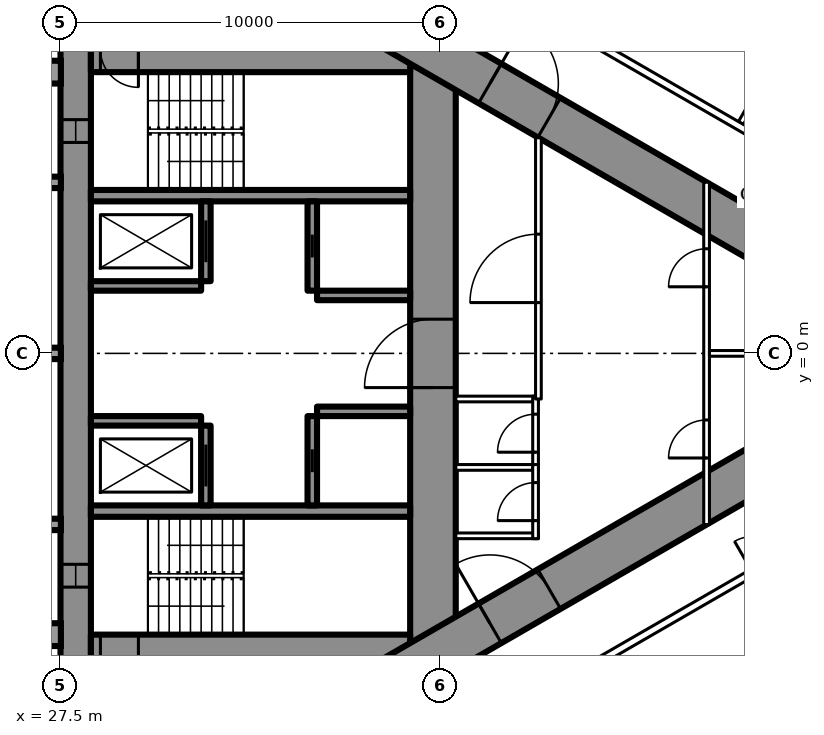
"""IFC4 building model, lengths in metres.
Left out: names, types, materials, properties, quantities, classifications, styles, units other than length and angle.
Written with IfcOpenShell. Run it as: python <this file> out.ifc"""

import sys

from ifc_helpers import new_model, si_unit, direction, frame, frame_2d, origin, place, context, subcontext, project, spatial, rectangle, extrude, element, fill, save


model = new_model("IFC4")
c1 = context("Model", 3, precision=1e-05, world=origin(), true_north=direction((0.0, 1.0)))
c2 = subcontext(c1, "Body", "Model", "MODEL_VIEW")
j1 = project(units=[si_unit("LENGTHUNIT", "METRE"), si_unit("PLANEANGLEUNIT", "RADIAN")], contexts=[c1])
p1 = place(None, origin())
s1 = spatial("IfcSite", under=j1, at=p1, CompositionType="ELEMENT")
p2 = place(p1, origin())
s2 = spatial("IfcBuilding", under=s1, at=p2, CompositionType="ELEMENT")
p3 = place(p2, frame((0.0, 0.0, 70.5)))
s3 = spatial("IfcBuildingStorey", under=s2, at=p3, CompositionType="ELEMENT", Elevation=70.5)
p4 = place(p3, frame((27.9, -8.6, 0.0), z_axis=(0.0, 0.0, 1.0), x_axis=(0.0, 1.0, 0.0)))
e1 = element("IfcWall", 1, at=p4, inside=s3, PredefinedType="SHEAR", context=c2, shape_type="SweptSolid", body=[
    extrude(rectangle(XDim=17.2, YDim=0.8, at=frame_2d((8.6, 0.0))), origin(), (0.0, 0.0, 1.0), 3.5),
])
p5 = place(p4, frame((2.45, 0.0, 0.6)))
e2 = element("IfcOpeningElement", 2, at=p5, cuts=e1, PredefinedType="OPENING", context=c2, shape_type="SweptSolid", body=[
    extrude(rectangle(XDim=0.6, YDim=2.1, at=frame_2d((0.3, 1.05))), frame((0.0, 0.41, 0.0), z_axis=(0.0, -1.0, 0.0), x_axis=(1.0, 0.0, 0.0)), (0.0, 0.0, 1.0), 0.82),
])
p6 = place(p4, frame((14.15, 0.0, 0.6)))
e3 = element("IfcOpeningElement", 3, at=p6, cuts=e1, PredefinedType="OPENING", context=c2, shape_type="SweptSolid", body=[
    extrude(rectangle(XDim=0.6, YDim=2.1, at=frame_2d((0.3, 1.05))), frame((0.0, 0.41, 0.0), z_axis=(0.0, -1.0, 0.0), x_axis=(1.0, 0.0, 0.0)), (0.0, 0.0, 1.0), 0.82),
])
p7 = place(p3, frame((37.3, -8.6, 0.0), z_axis=(0.0, 0.0, 1.0), x_axis=(0.0, 1.0, 0.0)))
e4 = element("IfcWall", 4, at=p7, inside=s3, PredefinedType="SHEAR", context=c2, shape_type="SweptSolid", body=[
    extrude(rectangle(XDim=17.2, YDim=1.2, at=frame_2d((8.6, 0.0))), origin(), (0.0, 0.0, 1.0), 3.5),
])
p8 = place(p7, frame((7.7, 0.0, 0.0)))
e5 = element("IfcOpeningElement", 5, at=p8, cuts=e4, PredefinedType="OPENING", context=c2, shape_type="SweptSolid", body=[
    extrude(rectangle(XDim=1.8, YDim=2.2, at=frame_2d((0.9, 1.1))), frame((0.0, 0.61, 0.0), z_axis=(0.0, -1.0, 0.0), x_axis=(1.0, 0.0, 0.0)), (0.0, 0.0, 1.0), 1.22),
])
p9 = place(p3, frame((28.3, -8.0, 0.0), z_axis=(0.0, 0.0, 1.0), x_axis=(1.0, 0.0, 0.0)))
e6 = element("IfcWall", 6, at=p9, inside=s3, PredefinedType="SHEAR", context=c2, shape_type="SweptSolid", body=[
    extrude(rectangle(XDim=8.4, YDim=1.2, at=frame_2d((4.2, 0.0))), origin(), (0.0, 0.0, 1.0), 3.5),
])
p10 = place(p9, frame((0.25, 0.0, 0.0)))
e7 = element("IfcOpeningElement", 7, at=p10, cuts=e6, PredefinedType="OPENING", context=c2, shape_type="SweptSolid", body=[
    extrude(rectangle(XDim=1.0, YDim=2.2, at=frame_2d((0.5, 1.1))), frame((0.0, 0.61, 0.0), z_axis=(0.0, -1.0, 0.0), x_axis=(1.0, 0.0, 0.0)), (0.0, 0.0, 1.0), 1.22),
])
p11 = place(p3, frame((28.3, 8.0, 0.0), z_axis=(0.0, 0.0, 1.0), x_axis=(1.0, 0.0, 0.0)))
e8 = element("IfcWall", 8, at=p11, inside=s3, PredefinedType="SHEAR", context=c2, shape_type="SweptSolid", body=[
    extrude(rectangle(XDim=8.4, YDim=1.2, at=frame_2d((4.2, 0.0))), origin(), (0.0, 0.0, 1.0), 3.5),
])
p12 = place(p11, frame((0.25, 0.0, 0.0)))
e9 = element("IfcOpeningElement", 9, at=p12, cuts=e8, PredefinedType="OPENING", context=c2, shape_type="SweptSolid", body=[
    extrude(rectangle(XDim=1.0, YDim=2.2, at=frame_2d((0.5, 1.1))), frame((0.0, 0.61, 0.0), z_axis=(0.0, -1.0, 0.0), x_axis=(1.0, 0.0, 0.0)), (0.0, 0.0, 1.0), 1.22),
])
for number, where, z_axis, x_axis in (
    (10, (28.3, -4.15, 0.0), (0.0, 0.0, 1.0), (1.0, 0.0, 0.0)),
    (11, (28.3, 4.15, 0.0), (0.0, 0.0, 1.0), (1.0, 0.0, 0.0)),
):
    element("IfcWall", number, at=place(p3, frame(where, z_axis=z_axis, x_axis=x_axis)), inside=s3, PredefinedType="SHEAR", context=c2, shape_type="SweptSolid", body=[
        extrude(rectangle(XDim=8.4, YDim=0.3, at=frame_2d((4.2, 0.0))), origin(), (0.0, 0.0, 1.0), 3.5),
    ])
p13 = place(p3, frame((31.325, -4.0, 0.0), z_axis=(0.0, 0.0, 1.0), x_axis=(0.0, 1.0, 0.0)))
e12 = element("IfcWall", 12, at=p13, inside=s3, PredefinedType="SHEAR", context=c2, shape_type="SweptSolid", body=[
    extrude(rectangle(XDim=2.1, YDim=0.25, at=frame_2d((1.05, 0.0))), origin(), (0.0, 0.0, 1.0), 3.5),
])
p14 = place(p13, frame((0.5, 0.0, 0.0)))
e13 = element("IfcOpeningElement", 13, at=p14, cuts=e12, PredefinedType="OPENING", context=c2, shape_type="SweptSolid", body=[
    extrude(rectangle(XDim=1.1, YDim=2.2, at=frame_2d((0.55, 1.1))), frame((0.0, 0.135, 0.0), z_axis=(0.0, -1.0, 0.0), x_axis=(1.0, 0.0, 0.0)), (0.0, 0.0, 1.0), 0.27),
])
p15 = place(p3, frame((34.125, -4.0, 0.0), z_axis=(0.0, 0.0, 1.0), x_axis=(0.0, 1.0, 0.0)))
e14 = element("IfcWall", 14, at=p15, inside=s3, PredefinedType="SHEAR", context=c2, shape_type="SweptSolid", body=[
    extrude(rectangle(XDim=2.35, YDim=0.25, at=frame_2d((1.175, 0.0))), origin(), (0.0, 0.0, 1.0), 3.5),
])
p16 = place(p15, frame((0.875, 0.0, 0.0)))
e15 = element("IfcOpeningElement", 15, at=p16, cuts=e14, PredefinedType="OPENING", context=c2, shape_type="SweptSolid", body=[
    extrude(rectangle(XDim=0.6, YDim=2.0, at=frame_2d((0.3, 1.0))), frame((0.0, 0.135, 0.0), z_axis=(0.0, -1.0, 0.0), x_axis=(1.0, 0.0, 0.0)), (0.0, 0.0, 1.0), 0.27),
])
p17 = place(p3, frame((28.3, -1.775, 0.0), z_axis=(0.0, 0.0, 1.0), x_axis=(1.0, 0.0, 0.0)))
e16 = element("IfcWall", 16, at=p17, inside=s3, PredefinedType="SHEAR", context=c2, shape_type="SweptSolid", body=[
    extrude(rectangle(XDim=2.9, YDim=0.25, at=frame_2d((1.45, 0.0))), origin(), (0.0, 0.0, 1.0), 3.5),
])
p18 = place(p3, frame((34.25, -1.525, 0.0), z_axis=(0.0, 0.0, 1.0), x_axis=(1.0, 0.0, 0.0)))
e17 = element("IfcWall", 17, at=p18, inside=s3, PredefinedType="SHEAR", context=c2, shape_type="SweptSolid", body=[
    extrude(rectangle(XDim=2.45, YDim=0.25, at=frame_2d((1.225, 0.0))), origin(), (0.0, 0.0, 1.0), 3.5),
])
p19 = place(p3, frame((31.325, 1.9, 0.0), z_axis=(0.0, 0.0, 1.0), x_axis=(0.0, 1.0, 0.0)))
e18 = element("IfcWall", 18, at=p19, inside=s3, PredefinedType="SHEAR", context=c2, shape_type="SweptSolid", body=[
    extrude(rectangle(XDim=2.1, YDim=0.25, at=frame_2d((1.05, 0.0))), origin(), (0.0, 0.0, 1.0), 3.5),
])
p20 = place(p19, frame((0.5, 0.0, 0.0)))
e19 = element("IfcOpeningElement", 19, at=p20, cuts=e18, PredefinedType="OPENING", context=c2, shape_type="SweptSolid", body=[
    extrude(rectangle(XDim=1.1, YDim=2.2, at=frame_2d((0.55, 1.1))), frame((0.0, 0.135, 0.0), z_axis=(0.0, -1.0, 0.0), x_axis=(1.0, 0.0, 0.0)), (0.0, 0.0, 1.0), 0.27),
])
p21 = place(p3, frame((34.125, 1.65, 0.0), z_axis=(0.0, 0.0, 1.0), x_axis=(0.0, 1.0, 0.0)))
e20 = element("IfcWall", 20, at=p21, inside=s3, PredefinedType="SHEAR", context=c2, shape_type="SweptSolid", body=[
    extrude(rectangle(XDim=2.35, YDim=0.25, at=frame_2d((1.175, 0.0))), origin(), (0.0, 0.0, 1.0), 3.5),
])
p22 = place(p21, frame((0.875, 0.0, 0.0)))
e21 = element("IfcOpeningElement", 21, at=p22, cuts=e20, PredefinedType="OPENING", context=c2, shape_type="SweptSolid", body=[
    extrude(rectangle(XDim=0.6, YDim=2.0, at=frame_2d((0.3, 1.0))), frame((0.0, 0.135, 0.0), z_axis=(0.0, -1.0, 0.0), x_axis=(1.0, 0.0, 0.0)), (0.0, 0.0, 1.0), 0.27),
])
p23 = place(p3, frame((28.3, 1.775, 0.0), z_axis=(0.0, 0.0, 1.0), x_axis=(1.0, 0.0, 0.0)))
e22 = element("IfcWall", 22, at=p23, inside=s3, PredefinedType="SHEAR", context=c2, shape_type="SweptSolid", body=[
    extrude(rectangle(XDim=2.9, YDim=0.25, at=frame_2d((1.45, 0.0))), origin(), (0.0, 0.0, 1.0), 3.5),
])
p24 = place(p3, frame((34.25, 1.525, 0.0), z_axis=(0.0, 0.0, 1.0), x_axis=(1.0, 0.0, 0.0)))
e23 = element("IfcWall", 23, at=p24, inside=s3, PredefinedType="SHEAR", context=c2, shape_type="SweptSolid", body=[
    extrude(rectangle(XDim=2.45, YDim=0.25, at=frame_2d((1.225, 0.0))), origin(), (0.0, 0.0, 1.0), 3.5),
])
p25 = place(p3, frame((27.2, -13.8, 0.0), z_axis=(0.0, 0.0, 1.0), x_axis=(0.866027159892, 0.499996958321, 0.0)))
e24 = element("IfcWall", 24, at=p25, inside=s3, PredefinedType="SHEAR", context=c2, shape_type="SweptSolid", body=[
    extrude(rectangle(XDim=27.947, YDim=1.2, at=frame_2d((13.973, 0.0))), origin(), (0.0, 0.0, 1.0), 3.5),
])
p26 = place(p25, frame((4.6, 0.0, 0.0)))
e25 = element("IfcOpeningElement", 25, at=p26, cuts=e24, PredefinedType="OPENING", context=c2, shape_type="SweptSolid", body=[
    extrude(rectangle(XDim=1.0, YDim=2.2, at=frame_2d((0.5, 1.1))), frame((0.0, 0.61, 0.0), z_axis=(0.0, -1.0, 0.0), x_axis=(1.0, 0.0, 0.0)), (0.0, 0.0, 1.0), 1.22),
])
p27 = place(p25, frame((13.395, 0.0, 0.0)))
e26 = element("IfcOpeningElement", 26, at=p27, cuts=e24, PredefinedType="OPENING", context=c2, shape_type="SweptSolid", body=[
    extrude(rectangle(XDim=1.8, YDim=2.2, at=frame_2d((0.9, 1.1))), frame((0.0, 0.61, 0.0), z_axis=(0.0, -1.0, 0.0), x_axis=(1.0, 0.0, 0.0)), (0.0, 0.0, 1.0), 1.22),
])
p28 = place(p3, frame((27.2, 13.8, 0.0), z_axis=(0.0, 0.0, 1.0), x_axis=(0.866024515034, -0.500001539357, 0.0)))
e27 = element("IfcWall", 27, at=p28, inside=s3, PredefinedType="SHEAR", context=c2, shape_type="SweptSolid", body=[
    extrude(rectangle(XDim=26.907, YDim=1.2, at=frame_2d((13.454, 0.0))), origin(), (0.0, 0.0, 1.0), 3.5),
])
p29 = place(p28, frame((4.6, 0.0, 0.0)))
e28 = element("IfcOpeningElement", 28, at=p29, cuts=e27, PredefinedType="OPENING", context=c2, shape_type="SweptSolid", body=[
    extrude(rectangle(XDim=1.0, YDim=2.2, at=frame_2d((0.5, 1.1))), frame((0.0, 0.61, 0.0), z_axis=(0.0, -1.0, 0.0), x_axis=(1.0, 0.0, 0.0)), (0.0, 0.0, 1.0), 1.22),
])
p30 = place(p28, frame((13.395, 0.0, 0.0)))
e29 = element("IfcOpeningElement", 29, at=p30, cuts=e27, PredefinedType="OPENING", context=c2, shape_type="SweptSolid", body=[
    extrude(rectangle(XDim=1.8, YDim=2.2, at=frame_2d((0.9, 1.1))), frame((0.0, 0.61, 0.0), z_axis=(0.0, -1.0, 0.0), x_axis=(1.0, 0.0, 0.0)), (0.0, 0.0, 1.0), 1.22),
])
p31 = place(p3, frame((45.403, 6.062, 0.0), z_axis=(0.0, 0.0, 1.0), x_axis=(0.500013434677, 0.866017647131, 0.0)))
e30 = element("IfcWall", 30, at=p31, inside=s3, PredefinedType="PARTITIONING", context=c2, shape_type="SweptSolid", body=[
    extrude(rectangle(XDim=9.902, YDim=0.15, at=frame_2d((4.951, 0.0))), origin(), (0.0, 0.0, 1.0), 2.25),
])
p32 = place(p3, frame((36.834, 10.894, 0.0), z_axis=(0.0, 0.0, 1.0), x_axis=(0.866028157229, -0.499995230863, 0.0)))
e31 = element("IfcWall", 31, at=p32, inside=s3, PredefinedType="PARTITIONING", context=c2, shape_type="SweptSolid", body=[
    extrude(rectangle(XDim=21.667, YDim=0.2, at=frame_2d((10.833, 0.0))), origin(), (0.0, 0.0, 1.0), 3.25),
])
p33 = place(p32, frame((18.885, 0.0, 0.0)))
e32 = element("IfcOpeningElement", 32, at=p33, cuts=e31, PredefinedType="OPENING", context=c2, shape_type="SweptSolid", body=[
    extrude(rectangle(XDim=0.95, YDim=2.2, at=frame_2d((0.475, 1.1))), frame((0.0, 0.11, 0.0), z_axis=(0.0, -1.0, 0.0), x_axis=(1.0, 0.0, 0.0)), (0.0, 0.0, 1.0), 0.22),
])
p34 = place(p32, frame((15.443, 0.0, 0.0)))
e33 = element("IfcOpeningElement", 33, at=p34, cuts=e31, PredefinedType="OPENING", context=c2, shape_type="SweptSolid", body=[
    extrude(rectangle(XDim=1.8, YDim=2.2, at=frame_2d((0.9, 1.1))), frame((0.0, 0.11, 0.0), z_axis=(0.0, -1.0, 0.0), x_axis=(1.0, 0.0, 0.0)), (0.0, 0.0, 1.0), 0.22),
])
p35 = place(p32, frame((12.562, 0.0, 0.0)))
e34 = element("IfcOpeningElement", 34, at=p35, cuts=e31, PredefinedType="OPENING", context=c2, shape_type="SweptSolid", body=[
    extrude(rectangle(XDim=0.95, YDim=2.2, at=frame_2d((0.475, 1.1))), frame((0.0, 0.11, 0.0), z_axis=(0.0, -1.0, 0.0), x_axis=(1.0, 0.0, 0.0)), (0.0, 0.0, 1.0), 0.22),
])
p36 = place(p32, frame((4.292, 0.0, 0.0)))
e35 = element("IfcOpeningElement", 35, at=p36, cuts=e31, PredefinedType="OPENING", context=c2, shape_type="SweptSolid", body=[
    extrude(rectangle(XDim=1.0, YDim=2.2, at=frame_2d((0.5, 1.1))), frame((0.0, 0.11, 0.0), z_axis=(0.0, -1.0, 0.0), x_axis=(1.0, 0.0, 0.0)), (0.0, 0.0, 1.0), 0.22),
])
p37 = place(p3, frame((37.96, -10.243, 0.0), z_axis=(0.0, 0.0, 1.0), x_axis=(0.866030548046, 0.499991089772, 0.0)))
e36 = element("IfcWall", 36, at=p37, inside=s3, PredefinedType="PARTITIONING", context=c2, shape_type="SweptSolid", body=[
    extrude(rectangle(XDim=12.849, YDim=0.2, at=frame_2d((6.425, 0.0))), origin(), (0.0, 0.0, 1.0), 3.25),
])
p38 = place(p37, frame((8.949, 0.0, 0.0)))
e37 = element("IfcOpeningElement", 37, at=p38, cuts=e36, PredefinedType="OPENING", context=c2, shape_type="SweptSolid", body=[
    extrude(rectangle(XDim=0.95, YDim=2.2, at=frame_2d((0.475, 1.1))), frame((0.0, 0.11, 0.0), z_axis=(0.0, -1.0, 0.0), x_axis=(1.0, 0.0, 0.0)), (0.0, 0.0, 1.0), 0.22),
])
p39 = place(p37, frame((0.6, 0.0, 0.0)))
e38 = element("IfcOpeningElement", 38, at=p39, cuts=e36, PredefinedType="OPENING", context=c2, shape_type="SweptSolid", body=[
    extrude(rectangle(XDim=0.95, YDim=2.2, at=frame_2d((0.475, 1.1))), frame((0.0, 0.11, 0.0), z_axis=(0.0, -1.0, 0.0), x_axis=(1.0, 0.0, 0.0)), (0.0, 0.0, 1.0), 0.22),
])
for number, where, z_axis, x_axis in (
    (39, (37.9, -1.2, 0.0), (0.0, 0.0, 1.0), (1.0, 0.0, 0.0)),
    (40, (37.9, -3.0, 0.0), (0.0, 0.0, 1.0), (1.0, 0.0, 0.0)),
    (41, (37.9, -4.8, 0.0), (0.0, 0.0, 1.0), (1.0, 0.0, 0.0)),
):
    element("IfcWall", number, at=place(p3, frame(where, z_axis=z_axis, x_axis=x_axis)), inside=s3, PredefinedType="PARTITIONING", context=c2, shape_type="SweptSolid", body=[
        extrude(rectangle(XDim=2.175, YDim=0.15, at=frame_2d((1.087, 0.0))), origin(), (0.0, 0.0, 1.0), 3.25),
    ])
p40 = place(p3, frame((40.0, -3.075, 0.0), z_axis=(0.0, 0.0, 1.0), x_axis=(0.0, 1.0, 0.0)))
e42 = element("IfcWall", 42, at=p40, inside=s3, PredefinedType="PARTITIONING", context=c2, shape_type="SweptSolid", body=[
    extrude(rectangle(XDim=1.95, YDim=0.15, at=frame_2d((0.975, 0.0))), origin(), (0.0, 0.0, 1.0), 3.25),
])
p41 = place(p40, frame((0.475, 0.0, 0.0)))
e43 = element("IfcOpeningElement", 43, at=p41, cuts=e42, PredefinedType="OPENING", context=c2, shape_type="SweptSolid", body=[
    extrude(rectangle(XDim=1.0, YDim=2.2, at=frame_2d((0.5, 1.1))), frame((0.0, 0.085, 0.0), z_axis=(0.0, -1.0, 0.0), x_axis=(1.0, 0.0, 0.0)), (0.0, 0.0, 1.0), 0.17),
])
p42 = place(p3, frame((40.0, -4.875, 0.0), z_axis=(0.0, 0.0, 1.0), x_axis=(0.0, 1.0, 0.0)))
e44 = element("IfcWall", 44, at=p42, inside=s3, PredefinedType="PARTITIONING", context=c2, shape_type="SweptSolid", body=[
    extrude(rectangle(XDim=1.95, YDim=0.15, at=frame_2d((0.975, 0.0))), origin(), (0.0, 0.0, 1.0), 3.25),
])
p43 = place(p42, frame((0.475, 0.0, 0.0)))
e45 = element("IfcOpeningElement", 45, at=p43, cuts=e44, PredefinedType="OPENING", context=c2, shape_type="SweptSolid", body=[
    extrude(rectangle(XDim=1.0, YDim=2.2, at=frame_2d((0.5, 1.1))), frame((0.0, 0.085, 0.0), z_axis=(0.0, -1.0, 0.0), x_axis=(1.0, 0.0, 0.0)), (0.0, 0.0, 1.0), 0.17),
])
p44 = place(p3, frame((40.075, -1.2, 0.0), z_axis=(0.0, 0.0, 1.0), x_axis=(0.0, 1.0, 0.0)))
e46 = element("IfcWall", 46, at=p44, inside=s3, PredefinedType="PARTITIONING", context=c2, shape_type="SweptSolid", body=[
    extrude(rectangle(XDim=6.874, YDim=0.15, at=frame_2d((3.437, 0.0))), origin(), (0.0, 0.0, 1.0), 3.25),
])
p45 = place(p44, frame((2.537, 0.0, 0.0)))
e47 = element("IfcOpeningElement", 47, at=p45, cuts=e46, PredefinedType="OPENING", context=c2, shape_type="SweptSolid", body=[
    extrude(rectangle(XDim=1.8, YDim=2.2, at=frame_2d((0.9, 1.1))), frame((0.0, 0.085, 0.0), z_axis=(0.0, -1.0, 0.0), x_axis=(1.0, 0.0, 0.0)), (0.0, 0.0, 1.0), 0.17),
])
p46 = place(p3, frame((44.5, -4.505, 0.0), z_axis=(0.0, 0.0, 1.0), x_axis=(0.0, 1.0, 0.0)))
e48 = element("IfcWall", 48, at=p46, inside=s3, PredefinedType="PARTITIONING", context=c2, shape_type="SweptSolid", body=[
    extrude(rectangle(XDim=9.009, YDim=0.15, at=frame_2d((4.505, 0.0))), origin(), (0.0, 0.0, 1.0), 2.45),
])
p47 = place(p46, frame((1.752, 0.0, 0.0)))
e49 = element("IfcOpeningElement", 49, at=p47, cuts=e48, PredefinedType="OPENING", context=c2, shape_type="SweptSolid", body=[
    extrude(rectangle(XDim=1.0, YDim=2.2, at=frame_2d((0.5, 1.1))), frame((0.0, 0.085, 0.0), z_axis=(0.0, -1.0, 0.0), x_axis=(1.0, 0.0, 0.0)), (0.0, 0.0, 1.0), 0.17),
])
p48 = place(p46, frame((6.257, 0.0, 0.0)))
e50 = element("IfcOpeningElement", 50, at=p48, cuts=e48, PredefinedType="OPENING", context=c2, shape_type="SweptSolid", body=[
    extrude(rectangle(XDim=1.0, YDim=2.2, at=frame_2d((0.5, 1.1))), frame((0.0, 0.085, 0.0), z_axis=(0.0, -1.0, 0.0), x_axis=(1.0, 0.0, 0.0)), (0.0, 0.0, 1.0), 0.17),
])
p49 = place(p3, frame((44.575, 0.0, 0.0), z_axis=(0.0, 0.0, 1.0), x_axis=(1.0, 0.0, 0.0)))
e51 = element("IfcWall", 51, at=p49, inside=s3, PredefinedType="PARTITIONING", context=c2, shape_type="SweptSolid", body=[
    extrude(rectangle(XDim=7.727, YDim=0.15, at=frame_2d((3.864, 0.0))), origin(), (0.0, 0.0, 1.0), 2.25),
])
p50 = place(p41, origin())
e52 = element("IfcDoor", 52, at=p50, inside=s3, OperationType="SINGLE_SWING_LEFT", PredefinedType="DOOR", context=c2, shape_type="SweptSolid", body=[
    extrude(rectangle(XDim=1.0, YDim=2.2, at=frame_2d((0.5, 1.1))), frame((0.0, 0.025, 0.0), z_axis=(0.0, -1.0, 0.0), x_axis=(1.0, 0.0, 0.0)), (0.0, 0.0, 1.0), 0.05),
])
fill(e43, e52)
p51 = place(p43, origin())
e53 = element("IfcDoor", 53, at=p51, inside=s3, OperationType="SINGLE_SWING_LEFT", PredefinedType="DOOR", context=c2, shape_type="SweptSolid", body=[
    extrude(rectangle(XDim=1.0, YDim=2.2, at=frame_2d((0.5, 1.1))), frame((0.0, 0.025, 0.0), z_axis=(0.0, -1.0, 0.0), x_axis=(1.0, 0.0, 0.0)), (0.0, 0.0, 1.0), 0.05),
])
fill(e45, e53)
p52 = place(p45, origin())
e54 = element("IfcDoor", 54, at=p52, inside=s3, OperationType="DOUBLE_DOOR_SINGLE_SWING", PredefinedType="DOOR", context=c2, shape_type="SweptSolid", body=[
    extrude(rectangle(XDim=1.8, YDim=2.2, at=frame_2d((0.9, 1.1))), frame((0.0, 0.025, 0.0), z_axis=(0.0, -1.0, 0.0), x_axis=(1.0, 0.0, 0.0)), (0.0, 0.0, 1.0), 0.05),
])
fill(e47, e54)
p53 = place(p47, origin())
e55 = element("IfcDoor", 55, at=p53, inside=s3, OperationType="SINGLE_SWING_LEFT", PredefinedType="DOOR", context=c2, shape_type="SweptSolid", body=[
    extrude(rectangle(XDim=1.0, YDim=2.2, at=frame_2d((0.5, 1.1))), frame((0.0, 0.025, 0.0), z_axis=(0.0, -1.0, 0.0), x_axis=(1.0, 0.0, 0.0)), (0.0, 0.0, 1.0), 0.05),
])
fill(e49, e55)
p54 = place(p48, origin())
e56 = element("IfcDoor", 56, at=p54, inside=s3, OperationType="SINGLE_SWING_LEFT", PredefinedType="DOOR", context=c2, shape_type="SweptSolid", body=[
    extrude(rectangle(XDim=1.0, YDim=2.2, at=frame_2d((0.5, 1.1))), frame((0.0, 0.025, 0.0), z_axis=(0.0, -1.0, 0.0), x_axis=(1.0, 0.0, 0.0)), (0.0, 0.0, 1.0), 0.05),
])
fill(e50, e56)
p55 = place(p27, origin())
e57 = element("IfcDoor", 57, at=p55, inside=s3, OperationType="DOUBLE_DOOR_SINGLE_SWING", PredefinedType="DOOR", context=c2, shape_type="SweptSolid", body=[
    extrude(rectangle(XDim=1.8, YDim=2.2, at=frame_2d((0.9, 1.1))), frame((0.0, 0.025, 0.0), z_axis=(0.0, -1.0, 0.0), x_axis=(1.0, 0.0, 0.0)), (0.0, 0.0, 1.0), 0.05),
])
fill(e26, e57)
p56 = place(p30, origin())
e58 = element("IfcDoor", 58, at=p56, inside=s3, OperationType="DOUBLE_DOOR_SINGLE_SWING", PredefinedType="DOOR", context=c2, shape_type="SweptSolid", body=[
    extrude(rectangle(XDim=1.8, YDim=2.2, at=frame_2d((0.9, 1.1))), frame((0.0, 0.025, 0.0), z_axis=(0.0, -1.0, 0.0), x_axis=(1.0, 0.0, 0.0)), (0.0, 0.0, 1.0), 0.05),
])
fill(e29, e58)
p57 = place(p8, origin())
e59 = element("IfcDoor", 59, at=p57, inside=s3, OperationType="DOUBLE_DOOR_SINGLE_SWING", PredefinedType="DOOR", context=c2, shape_type="SweptSolid", body=[
    extrude(rectangle(XDim=1.8, YDim=2.2, at=frame_2d((0.9, 1.1))), frame((0.0, 0.025, 0.0), z_axis=(0.0, -1.0, 0.0), x_axis=(1.0, 0.0, 0.0)), (0.0, 0.0, 1.0), 0.05),
])
fill(e5, e59)
p58 = place(p14, origin())
e60 = element("IfcDoor", 60, at=p58, inside=s3, OperationType="SLIDING_TO_LEFT", PredefinedType="USERDEFINED", context=c2, shape_type="SweptSolid", body=[
    extrude(rectangle(XDim=1.1, YDim=2.2, at=frame_2d((0.55, 1.1))), frame((0.0, 0.025, 0.0), z_axis=(0.0, -1.0, 0.0), x_axis=(1.0, 0.0, 0.0)), (0.0, 0.0, 1.0), 0.05),
])
fill(e13, e60)
p59 = place(p20, origin())
e61 = element("IfcDoor", 61, at=p59, inside=s3, OperationType="SLIDING_TO_LEFT", PredefinedType="USERDEFINED", context=c2, shape_type="SweptSolid", body=[
    extrude(rectangle(XDim=1.1, YDim=2.2, at=frame_2d((0.55, 1.1))), frame((0.0, 0.025, 0.0), z_axis=(0.0, -1.0, 0.0), x_axis=(1.0, 0.0, 0.0)), (0.0, 0.0, 1.0), 0.05),
])
fill(e19, e61)
p60 = place(p16, origin())
e62 = element("IfcDoor", 62, at=p60, inside=s3, OperationType="SLIDING_TO_LEFT", PredefinedType="DOOR", context=c2, shape_type="SweptSolid", body=[
    extrude(rectangle(XDim=0.6, YDim=2.0, at=frame_2d((0.3, 1.0))), frame((0.0, 0.025, 0.0), z_axis=(0.0, -1.0, 0.0), x_axis=(1.0, 0.0, 0.0)), (0.0, 0.0, 1.0), 0.05),
])
fill(e15, e62)
p61 = place(p22, origin())
e63 = element("IfcDoor", 63, at=p61, inside=s3, OperationType="SLIDING_TO_LEFT", PredefinedType="DOOR", context=c2, shape_type="SweptSolid", body=[
    extrude(rectangle(XDim=0.6, YDim=2.0, at=frame_2d((0.3, 1.0))), frame((0.0, 0.025, 0.0), z_axis=(0.0, -1.0, 0.0), x_axis=(1.0, 0.0, 0.0)), (0.0, 0.0, 1.0), 0.05),
])
fill(e21, e63)
p62 = place(p5, origin())
e64 = element("IfcWindow", 64, at=p62, inside=s3, PartitioningType="SINGLE_PANEL", PredefinedType="WINDOW", context=c2, shape_type="SweptSolid", body=[
    extrude(rectangle(XDim=0.6, YDim=2.1, at=frame_2d((0.3, 1.05))), frame((0.0, 0.03, 0.0), z_axis=(0.0, -1.0, 0.0), x_axis=(1.0, 0.0, 0.0)), (0.0, 0.0, 1.0), 0.06),
])
fill(e2, e64)
p63 = place(p6, origin())
e65 = element("IfcWindow", 65, at=p63, inside=s3, PartitioningType="SINGLE_PANEL", PredefinedType="WINDOW", context=c2, shape_type="SweptSolid", body=[
    extrude(rectangle(XDim=0.6, YDim=2.1, at=frame_2d((0.3, 1.05))), frame((0.0, 0.03, 0.0), z_axis=(0.0, -1.0, 0.0), x_axis=(1.0, 0.0, 0.0)), (0.0, 0.0, 1.0), 0.06),
])
fill(e3, e65)
save(model, sys.argv[1])
